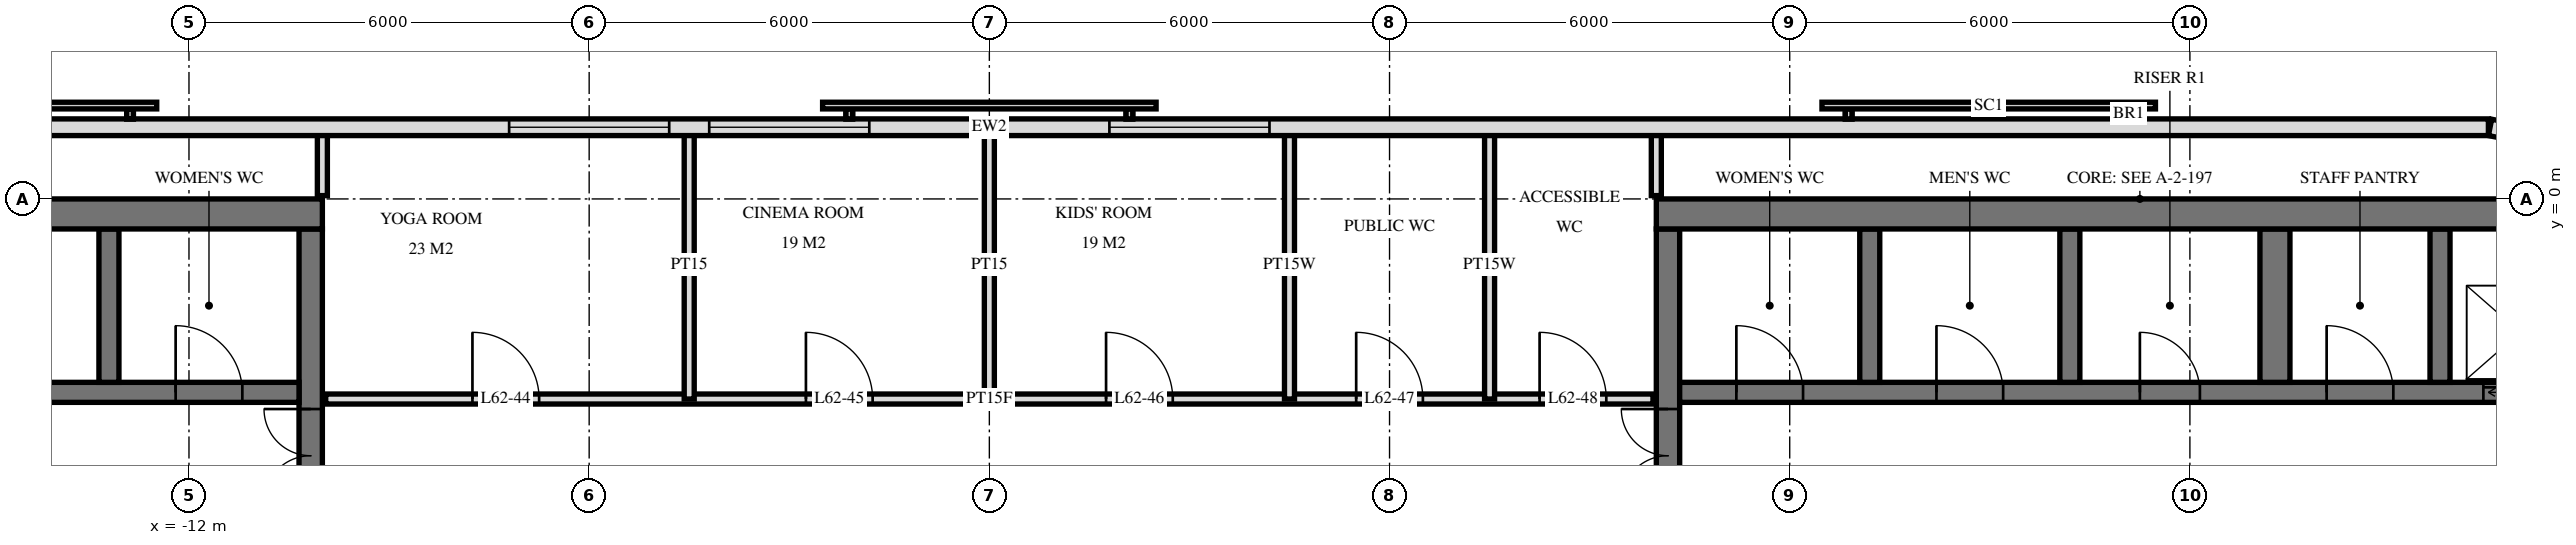
"""IFC4 building model, lengths in metres.
Left out: names, types, materials, properties, quantities, classifications, styles, units other than length and angle.
Written with IfcOpenShell. Run it as: python <this file> out.ifc"""

import sys

from ifc_helpers import new_model, si_unit, direction, frame, frame_2d, origin, place, context, subcontext, project, spatial, rectangle, extrude, element, fill, save


model = new_model("IFC4")
c1 = context("Model", 3, precision=1e-05, world=origin(), true_north=direction((0.0, 1.0)))
c2 = subcontext(c1, "Body", "Model", "MODEL_VIEW")
j1 = project(units=[si_unit("LENGTHUNIT", "METRE"), si_unit("PLANEANGLEUNIT", "RADIAN")], contexts=[c1])
p1 = place(None, origin())
s1 = spatial("IfcSite", under=j1, at=p1, CompositionType="ELEMENT")
p2 = place(p1, origin())
s2 = spatial("IfcBuilding", under=s1, at=p2, CompositionType="ELEMENT")
p3 = place(p2, frame((0.0, 0.0, 236.1)))
s3 = spatial("IfcBuildingStorey", under=s2, at=p3, CompositionType="ELEMENT", Elevation=236.1)
p4 = place(p3, frame((-24.5, -0.225, 0.0), z_axis=(0.0, 0.0, 1.0), x_axis=(1.0, 0.0, 0.0)))
e1 = element("IfcWall", 1, at=p4, inside=s3, PredefinedType="SHEAR", context=c2, shape_type="SweptSolid", body=[
    extrude(rectangle(XDim=14.5, YDim=0.45, at=frame_2d((7.25, 0.0))), origin(), (0.0, 0.0, 1.0), 3.5),
])
p5 = place(p3, frame((-10.175, -14.55, 0.0), z_axis=(0.0, 0.0, 1.0), x_axis=(0.0, 1.0, 0.0)))
e2 = element("IfcWall", 2, at=p5, inside=s3, PredefinedType="SHEAR", context=c2, shape_type="SweptSolid", body=[
    extrude(rectangle(XDim=14.1, YDim=0.35, at=frame_2d((7.05, 0.0))), origin(), (0.0, 0.0, 1.0), 3.5),
])
p6 = place(p5, frame((8.4, 0.0, 0.0)))
e3 = element("IfcOpeningElement", 3, at=p6, cuts=e2, PredefinedType="OPENING", context=c2, shape_type="SweptSolid", body=[
    extrude(rectangle(XDim=1.4, YDim=2.4, at=frame_2d((0.7, 1.2))), frame((0.0, 0.185, 0.0), z_axis=(0.0, -1.0, 0.0), x_axis=(1.0, 0.0, 0.0)), (0.0, 0.0, 1.0), 0.37),
])
p7 = place(p5, frame((10.0, 0.0, 0.0)))
e4 = element("IfcOpeningElement", 4, at=p7, cuts=e2, PredefinedType="OPENING", context=c2, shape_type="SweptSolid", body=[
    extrude(rectangle(XDim=1.4, YDim=2.4, at=frame_2d((0.7, 1.2))), frame((0.0, 0.185, 0.0), z_axis=(0.0, -1.0, 0.0), x_axis=(1.0, 0.0, 0.0)), (0.0, 0.0, 1.0), 0.37),
])
p8 = place(p5, frame((4.0, 0.0, 0.0)))
e5 = element("IfcOpeningElement", 5, at=p8, cuts=e2, PredefinedType="OPENING", context=c2, shape_type="SweptSolid", body=[
    extrude(rectangle(XDim=1.2, YDim=2.1, at=frame_2d((0.6, 1.05))), frame((0.0, 0.185, 0.0), z_axis=(0.0, -1.0, 0.0), x_axis=(1.0, 0.0, 0.0)), (0.0, 0.0, 1.0), 0.37),
])
p9 = place(p3, frame((-24.05, -2.9, 0.0), z_axis=(0.0, 0.0, 1.0), x_axis=(1.0, 0.0, 0.0)))
e6 = element("IfcWall", 6, at=p9, inside=s3, PredefinedType="SHEAR", context=c2, shape_type="SweptSolid", body=[
    extrude(rectangle(XDim=13.7, YDim=0.3, at=frame_2d((6.85, 0.0))), origin(), (0.0, 0.0, 1.0), 3.5),
])
p10 = place(p9, frame((0.55, 0.0, 0.0)))
e7 = element("IfcOpeningElement", 7, at=p10, cuts=e6, PredefinedType="OPENING", context=c2, shape_type="SweptSolid", body=[
    extrude(rectangle(XDim=1.1, YDim=2.1, at=frame_2d((0.55, 1.05))), frame((0.0, 0.16, 0.0), z_axis=(0.0, -1.0, 0.0), x_axis=(1.0, 0.0, 0.0)), (0.0, 0.0, 1.0), 0.32),
])
p11 = place(p9, frame((5.9, 0.0, 0.0)))
e8 = element("IfcOpeningElement", 8, at=p11, cuts=e6, PredefinedType="OPENING", context=c2, shape_type="SweptSolid", body=[
    extrude(rectangle(XDim=0.9, YDim=2.1, at=frame_2d((0.45, 1.05))), frame((0.0, 0.16, 0.0), z_axis=(0.0, -1.0, 0.0), x_axis=(1.0, 0.0, 0.0)), (0.0, 0.0, 1.0), 0.32),
])
p12 = place(p9, frame((11.85, 0.0, 0.0)))
e9 = element("IfcOpeningElement", 9, at=p12, cuts=e6, PredefinedType="OPENING", context=c2, shape_type="SweptSolid", body=[
    extrude(rectangle(XDim=1.0, YDim=2.1, at=frame_2d((0.5, 1.05))), frame((0.0, 0.16, 0.0), z_axis=(0.0, -1.0, 0.0), x_axis=(1.0, 0.0, 0.0)), (0.0, 0.0, 1.0), 0.32),
])
p13 = place(p9, frame((8.85, 0.0, 0.0)))
e10 = element("IfcOpeningElement", 10, at=p13, cuts=e6, PredefinedType="OPENING", context=c2, shape_type="SweptSolid", body=[
    extrude(rectangle(XDim=1.0, YDim=2.1, at=frame_2d((0.5, 1.05))), frame((0.0, 0.16, 0.0), z_axis=(0.0, -1.0, 0.0), x_axis=(1.0, 0.0, 0.0)), (0.0, 0.0, 1.0), 0.32),
])
p14 = place(p9, frame((3.0, 0.0, 0.0)))
e11 = element("IfcOpeningElement", 11, at=p14, cuts=e6, PredefinedType="OPENING", context=c2, shape_type="SweptSolid", body=[
    extrude(rectangle(XDim=1.0, YDim=2.1, at=frame_2d((0.5, 1.05))), frame((0.0, 0.16, 0.0), z_axis=(0.0, -1.0, 0.0), x_axis=(1.0, 0.0, 0.0)), (0.0, 0.0, 1.0), 0.32),
])
p15 = place(p3, frame((-13.2, -2.75, 0.0), z_axis=(0.0, 0.0, 1.0), x_axis=(0.0, 1.0, 0.0)))
e12 = element("IfcWall", 12, at=p15, inside=s3, PredefinedType="SHEAR", context=c2, shape_type="SweptSolid", body=[
    extrude(rectangle(XDim=2.3, YDim=0.3, at=frame_2d((1.15, 0.0))), origin(), (0.0, 0.0, 1.0), 3.5),
])
p16 = place(p3, frame((10.0, -0.225, 0.0), z_axis=(0.0, 0.0, 1.0), x_axis=(1.0, 0.0, 0.0)))
e13 = element("IfcWall", 13, at=p16, inside=s3, PredefinedType="SHEAR", context=c2, shape_type="SweptSolid", body=[
    extrude(rectangle(XDim=14.5, YDim=0.45, at=frame_2d((7.25, 0.0))), origin(), (0.0, 0.0, 1.0), 3.5),
])
p17 = place(p3, frame((10.175, -14.55, 0.0), z_axis=(0.0, 0.0, 1.0), x_axis=(0.0, 1.0, 0.0)))
e14 = element("IfcWall", 14, at=p17, inside=s3, PredefinedType="SHEAR", context=c2, shape_type="SweptSolid", body=[
    extrude(rectangle(XDim=14.1, YDim=0.35, at=frame_2d((7.05, 0.0))), origin(), (0.0, 0.0, 1.0), 3.5),
])
p18 = place(p17, frame((8.4, 0.0, 0.0)))
e15 = element("IfcOpeningElement", 15, at=p18, cuts=e14, PredefinedType="OPENING", context=c2, shape_type="SweptSolid", body=[
    extrude(rectangle(XDim=1.4, YDim=2.4, at=frame_2d((0.7, 1.2))), frame((0.0, 0.185, 0.0), z_axis=(0.0, -1.0, 0.0), x_axis=(1.0, 0.0, 0.0)), (0.0, 0.0, 1.0), 0.37),
])
p19 = place(p17, frame((10.0, 0.0, 0.0)))
e16 = element("IfcOpeningElement", 16, at=p19, cuts=e14, PredefinedType="OPENING", context=c2, shape_type="SweptSolid", body=[
    extrude(rectangle(XDim=1.4, YDim=2.4, at=frame_2d((0.7, 1.2))), frame((0.0, 0.185, 0.0), z_axis=(0.0, -1.0, 0.0), x_axis=(1.0, 0.0, 0.0)), (0.0, 0.0, 1.0), 0.37),
])
p20 = place(p17, frame((4.0, 0.0, 0.0)))
e17 = element("IfcOpeningElement", 17, at=p20, cuts=e14, PredefinedType="OPENING", context=c2, shape_type="SweptSolid", body=[
    extrude(rectangle(XDim=1.2, YDim=2.1, at=frame_2d((0.6, 1.05))), frame((0.0, 0.185, 0.0), z_axis=(0.0, -1.0, 0.0), x_axis=(1.0, 0.0, 0.0)), (0.0, 0.0, 1.0), 0.37),
])
p21 = place(p3, frame((10.35, -2.9, 0.0), z_axis=(0.0, 0.0, 1.0), x_axis=(1.0, 0.0, 0.0)))
e18 = element("IfcWall", 18, at=p21, inside=s3, PredefinedType="SHEAR", context=c2, shape_type="SweptSolid", body=[
    extrude(rectangle(XDim=13.7, YDim=0.3, at=frame_2d((6.85, 0.0))), origin(), (0.0, 0.0, 1.0), 3.5),
])
p22 = place(p21, frame((12.05, 0.0, 0.0)))
e19 = element("IfcOpeningElement", 19, at=p22, cuts=e18, PredefinedType="OPENING", context=c2, shape_type="SweptSolid", body=[
    extrude(rectangle(XDim=1.1, YDim=2.1, at=frame_2d((0.55, 1.05))), frame((0.0, 0.16, 0.0), z_axis=(0.0, -1.0, 0.0), x_axis=(1.0, 0.0, 0.0)), (0.0, 0.0, 1.0), 0.32),
])
p23 = place(p21, frame((6.9, 0.0, 0.0)))
e20 = element("IfcOpeningElement", 20, at=p23, cuts=e18, PredefinedType="OPENING", context=c2, shape_type="SweptSolid", body=[
    extrude(rectangle(XDim=0.9, YDim=2.1, at=frame_2d((0.45, 1.05))), frame((0.0, 0.16, 0.0), z_axis=(0.0, -1.0, 0.0), x_axis=(1.0, 0.0, 0.0)), (0.0, 0.0, 1.0), 0.32),
])
p24 = place(p21, frame((0.85, 0.0, 0.0)))
e21 = element("IfcOpeningElement", 21, at=p24, cuts=e18, PredefinedType="OPENING", context=c2, shape_type="SweptSolid", body=[
    extrude(rectangle(XDim=1.0, YDim=2.1, at=frame_2d((0.5, 1.05))), frame((0.0, 0.16, 0.0), z_axis=(0.0, -1.0, 0.0), x_axis=(1.0, 0.0, 0.0)), (0.0, 0.0, 1.0), 0.32),
])
p25 = place(p21, frame((3.85, 0.0, 0.0)))
e22 = element("IfcOpeningElement", 22, at=p25, cuts=e18, PredefinedType="OPENING", context=c2, shape_type="SweptSolid", body=[
    extrude(rectangle(XDim=1.0, YDim=2.1, at=frame_2d((0.5, 1.05))), frame((0.0, 0.16, 0.0), z_axis=(0.0, -1.0, 0.0), x_axis=(1.0, 0.0, 0.0)), (0.0, 0.0, 1.0), 0.32),
])
p26 = place(p21, frame((9.7, 0.0, 0.0)))
e23 = element("IfcOpeningElement", 23, at=p26, cuts=e18, PredefinedType="OPENING", context=c2, shape_type="SweptSolid", body=[
    extrude(rectangle(XDim=1.0, YDim=2.1, at=frame_2d((0.5, 1.05))), frame((0.0, 0.16, 0.0), z_axis=(0.0, -1.0, 0.0), x_axis=(1.0, 0.0, 0.0)), (0.0, 0.0, 1.0), 0.32),
])
for number, where, z_axis, x_axis in (
    (24, (13.2, -2.75, 0.0), (0.0, 0.0, 1.0), (0.0, 1.0, 0.0)),
    (25, (16.2, -2.75, 0.0), (0.0, 0.0, 1.0), (0.0, 1.0, 0.0)),
):
    element("IfcWall", number, at=place(p3, frame(where, z_axis=z_axis, x_axis=x_axis)), inside=s3, PredefinedType="SHEAR", context=c2, shape_type="SweptSolid", body=[
        extrude(rectangle(XDim=2.3, YDim=0.3, at=frame_2d((1.15, 0.0))), origin(), (0.0, 0.0, 1.0), 3.5),
    ])
p27 = place(p3, frame((19.275, -2.75, 0.0), z_axis=(0.0, 0.0, 1.0), x_axis=(0.0, 1.0, 0.0)))
e26 = element("IfcWall", 26, at=p27, inside=s3, PredefinedType="SHEAR", context=c2, shape_type="SweptSolid", body=[
    extrude(rectangle(XDim=2.3, YDim=0.45, at=frame_2d((1.15, 0.0))), origin(), (0.0, 0.0, 1.0), 3.5),
])
p28 = place(p3, frame((21.75, -2.75, 0.0), z_axis=(0.0, 0.0, 1.0), x_axis=(0.0, 1.0, 0.0)))
e27 = element("IfcWall", 27, at=p28, inside=s3, PredefinedType="SHEAR", context=c2, shape_type="SweptSolid", body=[
    extrude(rectangle(XDim=2.3, YDim=0.3, at=frame_2d((1.15, 0.0))), origin(), (0.0, 0.0, 1.0), 3.5),
])
p29 = place(p3, frame((24.149, 0.745, 0.0), z_axis=(0.0, 0.0, 1.0), x_axis=(-0.980803419081, 0.194999110559, 0.0)))
e28 = element("IfcWall", 28, at=p29, inside=s3, PredefinedType="SOLIDWALL", context=c2, shape_type="SweptSolid", body=[
    extrude(rectangle(XDim=1.681, YDim=0.25, at=frame_2d((0.841, 0.0))), origin(), (0.0, 0.0, 1.0), 3.22),
])
p30 = place(p3, frame((22.475, 1.075, 0.0), z_axis=(0.0, 0.0, 1.0), x_axis=(-1.0, 0.0, 0.0)))
e29 = element("IfcWall", 29, at=p30, inside=s3, PredefinedType="SOLIDWALL", context=c2, shape_type="SweptSolid", body=[
    extrude(rectangle(XDim=44.951, YDim=0.25, at=frame_2d((22.475, 0.0))), origin(), (0.0, 0.0, 1.0), 3.22),
])
p31 = place(p30, frame((18.275, 0.0, 0.9)))
e30 = element("IfcOpeningElement", 30, at=p31, cuts=e29, PredefinedType="OPENING", context=c2, shape_type="SweptSolid", body=[
    extrude(rectangle(XDim=2.4, YDim=1.5, at=frame_2d((1.2, 0.75))), frame((0.0, 0.135, 0.0), z_axis=(0.0, -1.0, 0.0), x_axis=(1.0, 0.0, 0.0)), (0.0, 0.0, 1.0), 0.27),
])
p32 = place(p30, frame((24.275, 0.0, 0.9)))
e31 = element("IfcOpeningElement", 31, at=p32, cuts=e29, PredefinedType="OPENING", context=c2, shape_type="SweptSolid", body=[
    extrude(rectangle(XDim=2.4, YDim=1.5, at=frame_2d((1.2, 0.75))), frame((0.0, 0.135, 0.0), z_axis=(0.0, -1.0, 0.0), x_axis=(1.0, 0.0, 0.0)), (0.0, 0.0, 1.0), 0.27),
])
p33 = place(p30, frame((27.275, 0.0, 0.9)))
e32 = element("IfcOpeningElement", 32, at=p33, cuts=e29, PredefinedType="OPENING", context=c2, shape_type="SweptSolid", body=[
    extrude(rectangle(XDim=2.4, YDim=1.5, at=frame_2d((1.2, 0.75))), frame((0.0, 0.135, 0.0), z_axis=(0.0, -1.0, 0.0), x_axis=(1.0, 0.0, 0.0)), (0.0, 0.0, 1.0), 0.27),
])
p34 = place(p3, frame((10.0, 0.05, 0.0), z_axis=(0.0, 0.0, 1.0), x_axis=(0.0, 1.0, 0.0)))
e33 = element("IfcWall", 33, at=p34, inside=s3, PredefinedType="PLUMBINGWALL", context=c2, shape_type="SweptSolid", body=[
    extrude(rectangle(XDim=0.97, YDim=0.15, at=frame_2d((0.485, 0.0))), origin(), (0.0, 0.0, 1.0), 3.22),
])
for number, where, z_axis, x_axis in (
    (34, (7.5, -3.0, 0.0), (0.0, 0.0, 1.0), (0.0, 1.0, 0.0)),
    (35, (4.5, -3.0, 0.0), (0.0, 0.0, 1.0), (0.0, 1.0, 0.0)),
):
    element("IfcWall", number, at=place(p3, frame(where, z_axis=z_axis, x_axis=x_axis)), inside=s3, PredefinedType="PLUMBINGWALL", context=c2, shape_type="SweptSolid", body=[
        extrude(rectangle(XDim=4.02, YDim=0.15, at=frame_2d((2.01, 0.0))), origin(), (0.0, 0.0, 1.0), 3.22),
    ])
for number, where, z_axis, x_axis in (
    (36, (0.0, -3.0, 0.0), (0.0, 0.0, 1.0), (0.0, 1.0, 0.0)),
    (37, (-4.5, -3.0, 0.0), (0.0, 0.0, 1.0), (0.0, 1.0, 0.0)),
):
    element("IfcWall", number, at=place(p3, frame(where, z_axis=z_axis, x_axis=x_axis)), inside=s3, PredefinedType="PARTITIONING", context=c2, shape_type="SweptSolid", body=[
        extrude(rectangle(XDim=4.02, YDim=0.15, at=frame_2d((2.01, 0.0))), origin(), (0.0, 0.0, 1.0), 3.22),
    ])
p35 = place(p3, frame((-10.0, 0.05, 0.0), z_axis=(0.0, 0.0, 1.0), x_axis=(0.0, 1.0, 0.0)))
e38 = element("IfcWall", 38, at=p35, inside=s3, PredefinedType="PARTITIONING", context=c2, shape_type="SweptSolid", body=[
    extrude(rectangle(XDim=0.97, YDim=0.15, at=frame_2d((0.485, 0.0))), origin(), (0.0, 0.0, 1.0), 3.22),
])
p36 = place(p3, frame((-9.95, -3.0, 0.0), z_axis=(0.0, 0.0, 1.0), x_axis=(1.0, 0.0, 0.0)))
e39 = element("IfcWall", 39, at=p36, inside=s3, PredefinedType="PARTITIONING", context=c2, shape_type="SweptSolid", body=[
    extrude(rectangle(XDim=19.9, YDim=0.15, at=frame_2d((9.95, 0.0))), origin(), (0.0, 0.0, 1.0), 3.22),
])
p37 = place(p36, frame((2.2, 0.0, 0.0)))
e40 = element("IfcOpeningElement", 40, at=p37, cuts=e39, PredefinedType="OPENING", context=c2, shape_type="SweptSolid", body=[
    extrude(rectangle(XDim=1.0, YDim=2.1, at=frame_2d((0.5, 1.05))), frame((0.0, 0.085, 0.0), z_axis=(0.0, -1.0, 0.0), x_axis=(1.0, 0.0, 0.0)), (0.0, 0.0, 1.0), 0.17),
])
p38 = place(p36, frame((7.2, 0.0, 0.0)))
e41 = element("IfcOpeningElement", 41, at=p38, cuts=e39, PredefinedType="OPENING", context=c2, shape_type="SweptSolid", body=[
    extrude(rectangle(XDim=1.0, YDim=2.1, at=frame_2d((0.5, 1.05))), frame((0.0, 0.085, 0.0), z_axis=(0.0, -1.0, 0.0), x_axis=(1.0, 0.0, 0.0)), (0.0, 0.0, 1.0), 0.17),
])
p39 = place(p36, frame((11.7, 0.0, 0.0)))
e42 = element("IfcOpeningElement", 42, at=p39, cuts=e39, PredefinedType="OPENING", context=c2, shape_type="SweptSolid", body=[
    extrude(rectangle(XDim=1.0, YDim=2.1, at=frame_2d((0.5, 1.05))), frame((0.0, 0.085, 0.0), z_axis=(0.0, -1.0, 0.0), x_axis=(1.0, 0.0, 0.0)), (0.0, 0.0, 1.0), 0.17),
])
p40 = place(p36, frame((15.45, 0.0, 0.0)))
e43 = element("IfcOpeningElement", 43, at=p40, cuts=e39, PredefinedType="OPENING", context=c2, shape_type="SweptSolid", body=[
    extrude(rectangle(XDim=1.0, YDim=2.1, at=frame_2d((0.5, 1.05))), frame((0.0, 0.085, 0.0), z_axis=(0.0, -1.0, 0.0), x_axis=(1.0, 0.0, 0.0)), (0.0, 0.0, 1.0), 0.17),
])
p41 = place(p36, frame((18.2, 0.0, 0.0)))
e44 = element("IfcOpeningElement", 44, at=p41, cuts=e39, PredefinedType="OPENING", context=c2, shape_type="SweptSolid", body=[
    extrude(rectangle(XDim=1.0, YDim=2.1, at=frame_2d((0.5, 1.05))), frame((0.0, 0.085, 0.0), z_axis=(0.0, -1.0, 0.0), x_axis=(1.0, 0.0, 0.0)), (0.0, 0.0, 1.0), 0.17),
])
p42 = place(p31, origin())
e45 = element("IfcWindow", 45, at=p42, inside=s3, PartitioningType="SINGLE_PANEL", PredefinedType="WINDOW", context=c2, shape_type="SweptSolid", body=[
    extrude(rectangle(XDim=2.4, YDim=1.5, at=frame_2d((1.2, 0.75))), frame((0.0, 0.03, 0.0), z_axis=(0.0, -1.0, 0.0), x_axis=(1.0, 0.0, 0.0)), (0.0, 0.0, 1.0), 0.06),
])
fill(e30, e45)
p43 = place(p32, origin())
e46 = element("IfcWindow", 46, at=p43, inside=s3, PartitioningType="SINGLE_PANEL", PredefinedType="WINDOW", context=c2, shape_type="SweptSolid", body=[
    extrude(rectangle(XDim=2.4, YDim=1.5, at=frame_2d((1.2, 0.75))), frame((0.0, 0.03, 0.0), z_axis=(0.0, -1.0, 0.0), x_axis=(1.0, 0.0, 0.0)), (0.0, 0.0, 1.0), 0.06),
])
fill(e31, e46)
p44 = place(p33, origin())
e47 = element("IfcWindow", 47, at=p44, inside=s3, PartitioningType="SINGLE_PANEL", PredefinedType="WINDOW", context=c2, shape_type="SweptSolid", body=[
    extrude(rectangle(XDim=2.4, YDim=1.5, at=frame_2d((1.2, 0.75))), frame((0.0, 0.03, 0.0), z_axis=(0.0, -1.0, 0.0), x_axis=(1.0, 0.0, 0.0)), (0.0, 0.0, 1.0), 0.06),
])
fill(e32, e47)
p45 = place(p22, origin())
e48 = element("IfcDoor", 48, at=p45, inside=s3, OperationType="DOUBLE_DOOR_SLIDING", PredefinedType="USERDEFINED", context=c2, shape_type="SweptSolid", body=[
    extrude(rectangle(XDim=1.1, YDim=2.1, at=frame_2d((0.55, 1.05))), frame((0.0, 0.025, 0.0), z_axis=(0.0, -1.0, 0.0), x_axis=(1.0, 0.0, 0.0)), (0.0, 0.0, 1.0), 0.05),
])
fill(e19, e48)
p46 = place(p7, origin())
e49 = element("IfcDoor", 49, at=p46, inside=s3, OperationType="DOUBLE_DOOR_SINGLE_SWING", PredefinedType="DOOR", context=c2, shape_type="SweptSolid", body=[
    extrude(rectangle(XDim=1.4, YDim=2.4, at=frame_2d((0.7, 1.2))), frame((0.0, 0.025, 0.0), z_axis=(0.0, -1.0, 0.0), x_axis=(1.0, 0.0, 0.0)), (0.0, 0.0, 1.0), 0.05),
])
fill(e4, e49)
p47 = place(p12, origin())
e50 = element("IfcDoor", 50, at=p47, inside=s3, OperationType="SINGLE_SWING_RIGHT", PredefinedType="DOOR", context=c2, shape_type="SweptSolid", body=[
    extrude(rectangle(XDim=1.0, YDim=2.1, at=frame_2d((0.5, 1.05))), frame((0.0, 0.025, 0.0), z_axis=(0.0, -1.0, 0.0), x_axis=(1.0, 0.0, 0.0)), (0.0, 0.0, 1.0), 0.05),
])
fill(e9, e50)
p48 = place(p19, origin())
e51 = element("IfcDoor", 51, at=p48, inside=s3, OperationType="DOUBLE_DOOR_SINGLE_SWING", PredefinedType="DOOR", context=c2, shape_type="SweptSolid", body=[
    extrude(rectangle(XDim=1.4, YDim=2.4, at=frame_2d((0.7, 1.2))), frame((0.0, 0.025, 0.0), z_axis=(0.0, -1.0, 0.0), x_axis=(1.0, 0.0, 0.0)), (0.0, 0.0, 1.0), 0.05),
])
fill(e16, e51)
p49 = place(p23, origin())
e52 = element("IfcDoor", 52, at=p49, inside=s3, OperationType="SINGLE_SWING_RIGHT", PredefinedType="DOOR", context=c2, shape_type="SweptSolid", body=[
    extrude(rectangle(XDim=0.9, YDim=2.1, at=frame_2d((0.45, 1.05))), frame((0.0, 0.025, 0.0), z_axis=(0.0, -1.0, 0.0), x_axis=(1.0, 0.0, 0.0)), (0.0, 0.0, 1.0), 0.05),
])
fill(e20, e52)
p50 = place(p24, origin())
e53 = element("IfcDoor", 53, at=p50, inside=s3, OperationType="SINGLE_SWING_RIGHT", PredefinedType="DOOR", context=c2, shape_type="SweptSolid", body=[
    extrude(rectangle(XDim=1.0, YDim=2.1, at=frame_2d((0.5, 1.05))), frame((0.0, 0.025, 0.0), z_axis=(0.0, -1.0, 0.0), x_axis=(1.0, 0.0, 0.0)), (0.0, 0.0, 1.0), 0.05),
])
fill(e21, e53)
p51 = place(p25, origin())
e54 = element("IfcDoor", 54, at=p51, inside=s3, OperationType="SINGLE_SWING_RIGHT", PredefinedType="DOOR", context=c2, shape_type="SweptSolid", body=[
    extrude(rectangle(XDim=1.0, YDim=2.1, at=frame_2d((0.5, 1.05))), frame((0.0, 0.025, 0.0), z_axis=(0.0, -1.0, 0.0), x_axis=(1.0, 0.0, 0.0)), (0.0, 0.0, 1.0), 0.05),
])
fill(e22, e54)
p52 = place(p26, origin())
e55 = element("IfcDoor", 55, at=p52, inside=s3, OperationType="SINGLE_SWING_RIGHT", PredefinedType="DOOR", context=c2, shape_type="SweptSolid", body=[
    extrude(rectangle(XDim=1.0, YDim=2.1, at=frame_2d((0.5, 1.05))), frame((0.0, 0.025, 0.0), z_axis=(0.0, -1.0, 0.0), x_axis=(1.0, 0.0, 0.0)), (0.0, 0.0, 1.0), 0.05),
])
fill(e23, e55)
p53 = place(p37, origin())
e56 = element("IfcDoor", 56, at=p53, inside=s3, OperationType="SINGLE_SWING_RIGHT", PredefinedType="DOOR", context=c2, shape_type="SweptSolid", body=[
    extrude(rectangle(XDim=1.0, YDim=2.1, at=frame_2d((0.5, 1.05))), frame((0.0, 0.025, 0.0), z_axis=(0.0, -1.0, 0.0), x_axis=(1.0, 0.0, 0.0)), (0.0, 0.0, 1.0), 0.05),
])
fill(e40, e56)
p54 = place(p38, origin())
e57 = element("IfcDoor", 57, at=p54, inside=s3, OperationType="SINGLE_SWING_RIGHT", PredefinedType="DOOR", context=c2, shape_type="SweptSolid", body=[
    extrude(rectangle(XDim=1.0, YDim=2.1, at=frame_2d((0.5, 1.05))), frame((0.0, 0.025, 0.0), z_axis=(0.0, -1.0, 0.0), x_axis=(1.0, 0.0, 0.0)), (0.0, 0.0, 1.0), 0.05),
])
fill(e41, e57)
p55 = place(p39, origin())
e58 = element("IfcDoor", 58, at=p55, inside=s3, OperationType="SINGLE_SWING_RIGHT", PredefinedType="DOOR", context=c2, shape_type="SweptSolid", body=[
    extrude(rectangle(XDim=1.0, YDim=2.1, at=frame_2d((0.5, 1.05))), frame((0.0, 0.025, 0.0), z_axis=(0.0, -1.0, 0.0), x_axis=(1.0, 0.0, 0.0)), (0.0, 0.0, 1.0), 0.05),
])
fill(e42, e58)
p56 = place(p40, origin())
e59 = element("IfcDoor", 59, at=p56, inside=s3, OperationType="SINGLE_SWING_RIGHT", PredefinedType="DOOR", context=c2, shape_type="SweptSolid", body=[
    extrude(rectangle(XDim=1.0, YDim=2.1, at=frame_2d((0.5, 1.05))), frame((0.0, 0.025, 0.0), z_axis=(0.0, -1.0, 0.0), x_axis=(1.0, 0.0, 0.0)), (0.0, 0.0, 1.0), 0.05),
])
fill(e43, e59)
p57 = place(p41, origin())
e60 = element("IfcDoor", 60, at=p57, inside=s3, OperationType="SINGLE_SWING_RIGHT", PredefinedType="DOOR", context=c2, shape_type="SweptSolid", body=[
    extrude(rectangle(XDim=1.0, YDim=2.1, at=frame_2d((0.5, 1.05))), frame((0.0, 0.025, 0.0), z_axis=(0.0, -1.0, 0.0), x_axis=(1.0, 0.0, 0.0)), (0.0, 0.0, 1.0), 0.05),
])
fill(e44, e60)
save(model, sys.argv[1])
